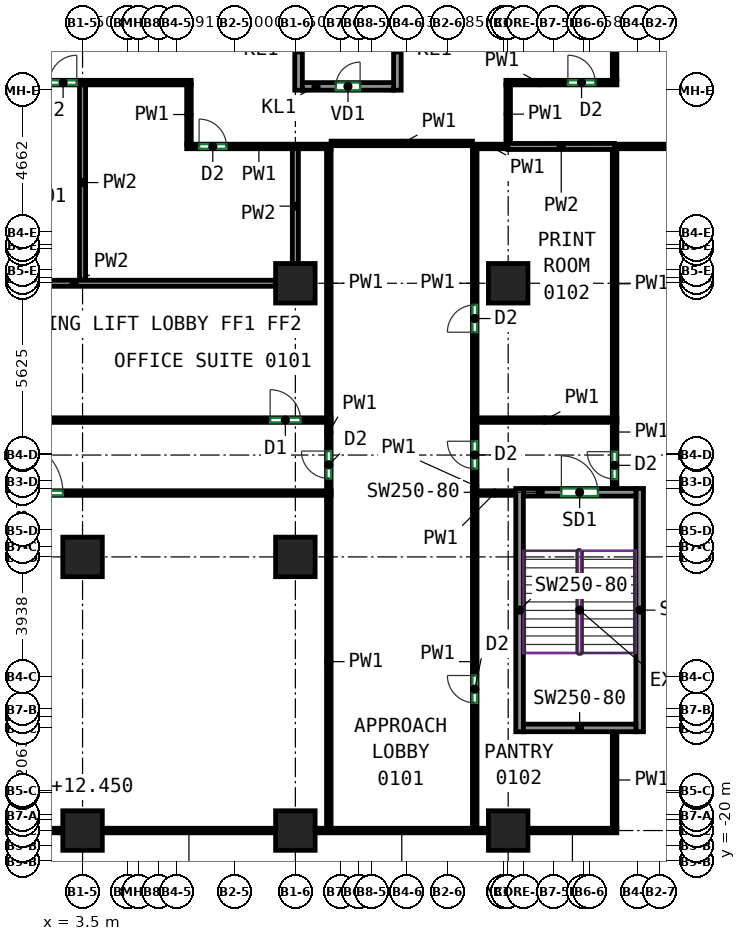
"""IFC4 building model, lengths in metres.
Left out: names, types, materials, properties, quantities, classifications, styles, units other than length and angle.
Written with IfcOpenShell. Run it as: python <this file> out.ifc"""

import sys

from ifc_helpers import new_model, si_unit, direction, frame, frame_2d, origin, origin_2d, place, context, subcontext, project, spatial, rectangle, extrude, source, transform, mapped, element, fill, save


model = new_model("IFC4")
c1 = context("Model", 3, precision=1e-05, world=origin(), true_north=direction((0.0, 1.0)))
c2 = subcontext(c1, "Body", "Model", "MODEL_VIEW")
j1 = project(units=[si_unit("LENGTHUNIT", "METRE"), si_unit("PLANEANGLEUNIT", "RADIAN")], contexts=[c1])
p1 = place(None, origin())
s1 = spatial("IfcSite", under=j1, at=p1, CompositionType="ELEMENT")
p2 = place(p1, origin())
s2 = spatial("IfcBuilding", under=s1, at=p2, CompositionType="ELEMENT")
p3 = place(p2, frame((0.0, 0.0, 9.0)))
s3 = spatial("IfcBuildingStorey", under=s2, at=p3, CompositionType="ELEMENT", Elevation=9.0)
m1 = source(origin(), c2, "Body", "SweptSolid", [
    extrude(rectangle(XDim=1.3, YDim=1.3, at=origin_2d()), origin(), (0.0, 0.0, 1.0), 4.1),
])
for number, where, z_axis, x_axis in (
    (1, (3.5, -19.0, 0.0), (0.0, 0.0, 1.0), (1.0, 0.0, 0.0)),
    (2, (3.5, -10.0, 0.0), (0.0, 0.0, 1.0), (1.0, 0.0, 0.0)),
    (3, (10.5, -19.0, 0.0), (0.0, 0.0, 1.0), (1.0, 0.0, 0.0)),
    (4, (10.5, -10.0, 0.0), (0.0, 0.0, 1.0), (1.0, 0.0, 0.0)),
    (5, (10.5, -1.0, 0.0), (0.0, 0.0, 1.0), (1.0, 0.0, 0.0)),
    (6, (17.5, -19.0, 0.0), (0.0, 0.0, 1.0), (1.0, 0.0, 0.0)),
    (7, (17.5, -1.0, 0.0), (0.0, 0.0, 1.0), (1.0, 0.0, 0.0)),
):
    element("IfcColumn", number, at=place(p3, frame(where, z_axis=z_axis, x_axis=x_axis)), inside=s3, PredefinedType="COLUMN", context=c2, shape_type="MappedRepresentation", body=[
        mapped(m1, transform((0.0, 0.0, 0.0))),
    ])
m2 = source(origin(), c2, "Body", "SweptSolid", [
    extrude(rectangle(XDim=8.0, YDim=0.25, at=frame_2d((4.0, 0.0))), origin(), (0.0, 0.0, 1.0), 4.1),
])
for number, where, z_axis, x_axis in (
    (8, (17.875, -15.75, 0.0), (0.0, 0.0, 1.0), (0.0, 1.0, 0.0)),
    (9, (21.825, -15.75, 0.0), (0.0, 0.0, 1.0), (0.0, 1.0, 0.0)),
):
    element("IfcWall", number, at=place(p3, frame(where, z_axis=z_axis, x_axis=x_axis)), inside=s3, PredefinedType="SHEAR", context=c2, shape_type="MappedRepresentation", body=[
        mapped(m2, transform((0.0, 0.0, 0.0))),
    ])
m3 = source(origin(), c2, "Body", "SweptSolid", [
    extrude(rectangle(XDim=3.7, YDim=0.25, at=frame_2d((1.85, 0.0))), origin(), (0.0, 0.0, 1.0), 4.1),
])
p4 = place(p3, frame((18.0, -15.625, 0.0), z_axis=(0.0, 0.0, 1.0), x_axis=(1.0, 0.0, 0.0)))
e10 = element("IfcWall", 10, at=p4, inside=s3, PredefinedType="SHEAR", context=c2, shape_type="MappedRepresentation", body=[
    mapped(m3, transform((0.0, 0.0, 0.0))),
])
p5 = place(p3, frame((18.0, -7.875, 0.0), z_axis=(0.0, 0.0, 1.0), x_axis=(1.0, 0.0, 0.0)))
e11 = element("IfcWall", 11, at=p5, inside=s3, PredefinedType="SHEAR", context=c2, shape_type="MappedRepresentation", body=[
    mapped(m3, transform((0.0, 0.0, 0.0))),
])
p6 = place(p5, frame((1.25, 0.0, 0.0)))
e12 = element("IfcOpeningElement", 12, at=p6, cuts=e11, PredefinedType="OPENING", context=c2, shape_type="SweptSolid", body=[
    extrude(rectangle(XDim=1.2, YDim=2.1, at=frame_2d((0.6, 1.05))), frame((0.0, 0.135, 0.0), z_axis=(0.0, -1.0, 0.0), x_axis=(1.0, 0.0, 0.0)), (0.0, 0.0, 1.0), 0.27),
])
m4 = source(origin(), c2, "Body", "SweptSolid", [
    extrude(rectangle(XDim=2.65, YDim=0.25, at=frame_2d((1.325, 0.0))), origin(), (0.0, 0.0, 1.0), 4.1),
])
for number, where, z_axis, x_axis in (
    (13, (10.605, 5.35, 0.0), (0.0, 0.0, 1.0), (0.0, 1.0, 0.0)),
    (14, (13.855, 5.35, 0.0), (0.0, 0.0, 1.0), (0.0, 1.0, 0.0)),
):
    element("IfcWall", number, at=place(p3, frame(where, z_axis=z_axis, x_axis=x_axis)), inside=s3, PredefinedType="PARTITIONING", context=c2, shape_type="MappedRepresentation", body=[
        mapped(m4, transform((0.0, 0.0, 0.0))),
    ])
m5 = source(origin(), c2, "Body", "SweptSolid", [
    extrude(rectangle(XDim=3.0, YDim=0.25, at=frame_2d((1.5, 0.0))), origin(), (0.0, 0.0, 1.0), 4.1),
])
p7 = place(p3, frame((10.73, 5.475, 0.0), z_axis=(0.0, 0.0, 1.0), x_axis=(1.0, 0.0, 0.0)))
e15 = element("IfcWall", 15, at=p7, inside=s3, PredefinedType="PARTITIONING", context=c2, shape_type="MappedRepresentation", body=[
    mapped(m5, transform((0.0, 0.0, 0.0))),
])
p8 = place(p7, frame((1.1, 0.0, 0.0)))
e16 = element("IfcOpeningElement", 16, at=p8, cuts=e15, PredefinedType="OPENING", context=c2, shape_type="SweptSolid", body=[
    extrude(rectangle(XDim=0.8, YDim=2.0, at=frame_2d((0.4, 1.0))), frame((0.0, 0.135, 0.0), z_axis=(0.0, -1.0, 0.0), x_axis=(1.0, 0.0, 0.0)), (0.0, 0.0, 1.0), 0.27),
])
p9 = place(p3, frame((21.0, -7.75, 0.0), z_axis=(0.0, 0.0, 1.0), x_axis=(0.0, 1.0, 0.0)))
e17 = element("IfcWall", 17, at=p9, inside=s3, PredefinedType="PARTITIONING", context=c2, shape_type="SweptSolid", body=[
    extrude(rectangle(XDim=2.185, YDim=0.15, at=frame_2d((1.093, 0.0))), origin(), (0.0, 0.0, 1.0), 4.1),
])
p10 = place(p9, frame((0.311, 0.0, 0.0)))
e18 = element("IfcOpeningElement", 18, at=p10, cuts=e17, PredefinedType="OPENING", context=c2, shape_type="SweptSolid", body=[
    extrude(rectangle(XDim=0.9, YDim=2.1, at=frame_2d((0.45, 1.05))), frame((0.0, 0.085, 0.0), z_axis=(0.0, -1.0, 0.0), x_axis=(1.0, 0.0, 0.0)), (0.0, 0.0, 1.0), 0.17),
])
for number, where, z_axis, x_axis in (
    (19, (-2.85, -19.0, 0.0), (0.0, 0.0, 1.0), (1.0, 0.0, 0.0)),
    (20, (4.15, -19.0, 0.0), (0.0, 0.0, 1.0), (1.0, 0.0, 0.0)),
    (21, (11.15, -19.0, 0.0), (0.0, 0.0, 1.0), (1.0, 0.0, 0.0)),
):
    element("IfcWall", number, at=place(p3, frame(where, z_axis=z_axis, x_axis=x_axis)), inside=s3, PredefinedType="PARTITIONING", context=c2, shape_type="SweptSolid", body=[
        extrude(rectangle(XDim=5.7, YDim=0.15, at=frame_2d((2.85, 0.0))), origin(), (0.0, 0.0, 1.0), 3.45),
    ])
p11 = place(p3, frame((21.0, -5.434, 0.0), z_axis=(0.0, 0.0, 1.0), x_axis=(0.0, 1.0, 0.0)))
e22 = element("IfcWall", 22, at=p11, inside=s3, PredefinedType="PARTITIONING", context=c2, shape_type="SweptSolid", body=[
    extrude(rectangle(XDim=8.834, YDim=0.15, at=frame_2d((4.417, 0.0))), origin(), (0.0, 0.0, 1.0), 4.1),
])
p12 = place(p3, frame((20.999, 3.5, 0.0), z_axis=(0.0, 0.0, 1.0), x_axis=(1.0, 0.0, 0.0)))
e23 = element("IfcWall", 23, at=p12, inside=s3, PredefinedType="PARTITIONING", context=c2, shape_type="SweptSolid", body=[
    extrude(rectangle(XDim=6.751, YDim=0.15, at=frame_2d((3.375, 0.0))), origin(), (0.0, 0.0, 1.0), 4.1),
])
p13 = place(p3, frame((18.15, -19.0, 0.0), z_axis=(0.0, 0.0, 1.0), x_axis=(1.0, 0.0, 0.0)))
e24 = element("IfcWall", 24, at=p13, inside=s3, PredefinedType="PARTITIONING", context=c2, shape_type="SweptSolid", body=[
    extrude(rectangle(XDim=2.925, YDim=0.15, at=frame_2d((1.462, 0.0))), origin(), (0.0, 0.0, 1.0), 3.45),
])
p14 = place(p3, frame((21.0, -18.925, 0.0), z_axis=(0.0, 0.0, 1.0), x_axis=(0.0, 1.0, 0.0)))
e25 = element("IfcWall", 25, at=p14, inside=s3, PredefinedType="PARTITIONING", context=c2, shape_type="SweptSolid", body=[
    extrude(rectangle(XDim=3.175, YDim=0.15, at=frame_2d((1.587, 0.0))), origin(), (0.0, 0.0, 1.0), 4.1),
])
p15 = place(p3, frame((11.6, -7.835, 0.0), z_axis=(0.0, 0.0, 1.0), x_axis=(0.0, 1.0, 0.0)))
e26 = element("IfcWall", 26, at=p15, inside=s3, PredefinedType="PARTITIONING", context=c2, shape_type="SweptSolid", body=[
    extrude(rectangle(XDim=2.27, YDim=0.15, at=frame_2d((1.135, 0.0))), origin(), (0.0, 0.0, 1.0), 4.1),
])
p16 = place(p15, frame((0.416, 0.0, 0.0)))
e27 = element("IfcOpeningElement", 27, at=p16, cuts=e26, PredefinedType="OPENING", context=c2, shape_type="SweptSolid", body=[
    extrude(rectangle(XDim=0.9, YDim=2.1, at=frame_2d((0.45, 1.05))), frame((0.0, 0.085, 0.0), z_axis=(0.0, -1.0, 0.0), x_axis=(1.0, 0.0, 0.0)), (0.0, 0.0, 1.0), 0.17),
])
p17 = place(p3, frame((16.4, -7.835, 0.0), z_axis=(0.0, 0.0, 1.0), x_axis=(0.0, 1.0, 0.0)))
e28 = element("IfcWall", 28, at=p17, inside=s3, PredefinedType="PARTITIONING", context=c2, shape_type="SweptSolid", body=[
    extrude(rectangle(XDim=2.27, YDim=0.15, at=frame_2d((1.135, 0.0))), origin(), (0.0, 0.0, 1.0), 4.1),
])
p18 = place(p17, frame((0.739, 0.0, 0.0)))
e29 = element("IfcOpeningElement", 29, at=p18, cuts=e28, PredefinedType="OPENING", context=c2, shape_type="SweptSolid", body=[
    extrude(rectangle(XDim=0.9, YDim=2.1, at=frame_2d((0.45, 1.05))), frame((0.0, 0.085, 0.0), z_axis=(0.0, -1.0, 0.0), x_axis=(1.0, 0.0, 0.0)), (0.0, 0.0, 1.0), 0.17),
])
p19 = place(p3, frame((16.325, 3.6, 0.0), z_axis=(0.0, 0.0, 1.0), x_axis=(-1.0, 0.0, 0.0)))
e30 = element("IfcWall", 30, at=p19, inside=s3, PredefinedType="PARTITIONING", context=c2, shape_type="SweptSolid", body=[
    extrude(rectangle(XDim=4.65, YDim=0.15, at=frame_2d((2.325, 0.0))), origin(), (0.0, 0.0, 1.0), 4.1),
])
p20 = place(p3, frame((11.6, -18.925, 0.0), z_axis=(0.0, 0.0, 1.0), x_axis=(0.0, 1.0, 0.0)))
e31 = element("IfcWall", 31, at=p20, inside=s3, PredefinedType="PARTITIONING", context=c2, shape_type="SweptSolid", body=[
    extrude(rectangle(XDim=10.959, YDim=0.15, at=frame_2d((5.479, 0.0))), origin(), (0.0, 0.0, 1.0), 4.1),
])
p21 = place(p3, frame((11.6, -5.434, 0.0), z_axis=(0.0, 0.0, 1.0), x_axis=(0.0, 1.0, 0.0)))
e32 = element("IfcWall", 32, at=p21, inside=s3, PredefinedType="PARTITIONING", context=c2, shape_type="SweptSolid", body=[
    extrude(rectangle(XDim=8.868, YDim=0.15, at=frame_2d((4.434, 0.0))), origin(), (0.0, 0.0, 1.0), 4.1),
])
p22 = place(p3, frame((16.4, -5.434, 0.0), z_axis=(0.0, 0.0, 1.0), x_axis=(0.0, 1.0, 0.0)))
e33 = element("IfcWall", 33, at=p22, inside=s3, PredefinedType="PARTITIONING", context=c2, shape_type="SweptSolid", body=[
    extrude(rectangle(XDim=8.868, YDim=0.15, at=frame_2d((4.434, 0.0))), origin(), (0.0, 0.0, 1.0), 4.1),
])
p23 = place(p22, frame((2.824, 0.0, 0.0)))
e34 = element("IfcOpeningElement", 34, at=p23, cuts=e33, PredefinedType="OPENING", context=c2, shape_type="SweptSolid", body=[
    extrude(rectangle(XDim=0.9, YDim=2.1, at=frame_2d((0.45, 1.05))), frame((0.0, 0.085, 0.0), z_axis=(0.0, -1.0, 0.0), x_axis=(1.0, 0.0, 0.0)), (0.0, 0.0, 1.0), 0.17),
])
p24 = place(p3, frame((16.4, -18.925, 0.0), z_axis=(0.0, 0.0, 1.0), x_axis=(0.0, 1.0, 0.0)))
e35 = element("IfcWall", 35, at=p24, inside=s3, PredefinedType="PARTITIONING", context=c2, shape_type="SweptSolid", body=[
    extrude(rectangle(XDim=10.959, YDim=0.15, at=frame_2d((5.479, 0.0))), origin(), (0.0, 0.0, 1.0), 4.1),
])
p25 = place(p24, frame((4.124, 0.0, 0.0)))
e36 = element("IfcOpeningElement", 36, at=p25, cuts=e35, PredefinedType="OPENING", context=c2, shape_type="SweptSolid", body=[
    extrude(rectangle(XDim=0.9, YDim=2.1, at=frame_2d((0.45, 1.05))), frame((0.0, 0.085, 0.0), z_axis=(0.0, -1.0, 0.0), x_axis=(1.0, 0.0, 0.0)), (0.0, 0.0, 1.0), 0.17),
])
p26 = place(p3, frame((-11.775, -7.9, 0.0), z_axis=(0.0, 0.0, 1.0), x_axis=(1.0, 0.0, 0.0)))
e37 = element("IfcWall", 37, at=p26, inside=s3, PredefinedType="PARTITIONING", context=c2, shape_type="SweptSolid", body=[
    extrude(rectangle(XDim=23.45, YDim=0.15, at=frame_2d((11.725, 0.0))), origin(), (0.0, 0.0, 1.0), 4.1),
])
p27 = place(p26, frame((12.83, 0.0, 0.0)))
e38 = element("IfcOpeningElement", 38, at=p27, cuts=e37, PredefinedType="OPENING", context=c2, shape_type="SweptSolid", body=[
    extrude(rectangle(XDim=1.8, YDim=2.1, at=frame_2d((0.9, 1.05))), frame((0.0, 0.085, 0.0), z_axis=(0.0, -1.0, 0.0), x_axis=(1.0, 0.0, 0.0)), (0.0, 0.0, 1.0), 0.17),
])
p28 = place(p3, frame((-17.075, -5.5, 0.0), z_axis=(0.0, 0.0, 1.0), x_axis=(1.0, 0.0, 0.0)))
e39 = element("IfcWall", 39, at=p28, inside=s3, PredefinedType="PARTITIONING", context=c2, shape_type="SweptSolid", body=[
    extrude(rectangle(XDim=28.75, YDim=0.15, at=frame_2d((14.375, 0.0))), origin(), (0.0, 0.0, 1.0), 4.1),
])
p29 = place(p28, frame((1.912, 0.0, 0.0)))
e40 = element("IfcOpeningElement", 40, at=p29, cuts=e39, PredefinedType="OPENING", context=c2, shape_type="SweptSolid", body=[
    extrude(rectangle(XDim=0.9, YDim=2.1, at=frame_2d((0.45, 1.05))), frame((0.0, 0.085, 0.0), z_axis=(0.0, -1.0, 0.0), x_axis=(1.0, 0.0, 0.0)), (0.0, 0.0, 1.0), 0.17),
])
p30 = place(p28, frame((26.745, 0.0, 0.0)))
e41 = element("IfcOpeningElement", 41, at=p30, cuts=e39, PredefinedType="OPENING", context=c2, shape_type="SweptSolid", body=[
    extrude(rectangle(XDim=1.0, YDim=2.1, at=frame_2d((0.5, 1.05))), frame((0.0, 0.085, 0.0), z_axis=(0.0, -1.0, 0.0), x_axis=(1.0, 0.0, 0.0)), (0.0, 0.0, 1.0), 0.17),
])
p31 = place(p3, frame((16.325, -5.5, 0.0), z_axis=(0.0, 0.0, 1.0), x_axis=(1.0, 0.0, 0.0)))
e42 = element("IfcWall", 42, at=p31, inside=s3, PredefinedType="PARTITIONING", context=c2, shape_type="SweptSolid", body=[
    extrude(rectangle(XDim=4.75, YDim=0.15, at=frame_2d((2.375, 0.0))), origin(), (0.0, 0.0, 1.0), 4.1),
])
p32 = place(p3, frame((16.325, -7.9, 0.0), z_axis=(0.0, 0.0, 1.0), x_axis=(1.0, 0.0, 0.0)))
e43 = element("IfcWall", 43, at=p32, inside=s3, PredefinedType="PARTITIONING", context=c2, shape_type="SweptSolid", body=[
    extrude(rectangle(XDim=1.475, YDim=0.15, at=frame_2d((0.738, 0.0))), origin(), (0.0, 0.0, 1.0), 4.1),
])
p33 = place(p3, frame((-3.575, 5.6, 0.0), z_axis=(0.0, 0.0, 1.0), x_axis=(1.0, 0.0, 0.0)))
e44 = element("IfcWall", 44, at=p33, inside=s3, PredefinedType="PARTITIONING", context=c2, shape_type="SweptSolid", body=[
    extrude(rectangle(XDim=10.65, YDim=0.15, at=frame_2d((5.325, 0.0))), origin(), (0.0, 0.0, 1.0), 4.1),
])
p34 = place(p33, frame((5.985, 0.0, 0.0)))
e45 = element("IfcOpeningElement", 45, at=p34, cuts=e44, PredefinedType="OPENING", context=c2, shape_type="SweptSolid", body=[
    extrude(rectangle(XDim=0.9, YDim=2.1, at=frame_2d((0.45, 1.05))), frame((0.0, 0.085, 0.0), z_axis=(0.0, -1.0, 0.0), x_axis=(1.0, 0.0, 0.0)), (0.0, 0.0, 1.0), 0.17),
])
p35 = place(p3, frame((6.925, 3.5, 0.0), z_axis=(0.0, 0.0, 1.0), x_axis=(1.0, 0.0, 0.0)))
e46 = element("IfcWall", 46, at=p35, inside=s3, PredefinedType="PARTITIONING", context=c2, shape_type="SweptSolid", body=[
    extrude(rectangle(XDim=4.75, YDim=0.15, at=frame_2d((2.375, 0.0))), origin(), (0.0, 0.0, 1.0), 4.1),
])
p36 = place(p35, frame((0.408, 0.0, 0.0)))
e47 = element("IfcOpeningElement", 47, at=p36, cuts=e46, PredefinedType="OPENING", context=c2, shape_type="SweptSolid", body=[
    extrude(rectangle(XDim=0.9, YDim=2.1, at=frame_2d((0.45, 1.05))), frame((0.0, 0.085, 0.0), z_axis=(0.0, -1.0, 0.0), x_axis=(1.0, 0.0, 0.0)), (0.0, 0.0, 1.0), 0.17),
])
p37 = place(p3, frame((7.0, 5.525, 0.0), z_axis=(0.0, 0.0, 1.0), x_axis=(0.0, -1.0, 0.0)))
e48 = element("IfcWall", 48, at=p37, inside=s3, PredefinedType="PARTITIONING", context=c2, shape_type="SweptSolid", body=[
    extrude(rectangle(XDim=1.95, YDim=0.15, at=frame_2d((0.975, 0.0))), origin(), (0.0, 0.0, 1.0), 4.1),
])
p38 = place(p3, frame((16.325, 3.5, 0.0), z_axis=(0.0, 0.0, 1.0), x_axis=(1.0, 0.0, 0.0)))
e49 = element("IfcWall", 49, at=p38, inside=s3, PredefinedType="PARTITIONING", context=c2, shape_type="SweptSolid", body=[
    extrude(rectangle(XDim=1.166, YDim=0.15, at=frame_2d((0.583, 0.0))), origin(), (0.0, 0.0, 1.0), 4.1),
])
p39 = place(p3, frame((21.0, 5.675, 0.0), z_axis=(0.0, 0.0, 1.0), x_axis=(0.0, 1.0, 0.0)))
e50 = element("IfcWall", 50, at=p39, inside=s3, PredefinedType="PARTITIONING", context=c2, shape_type="SweptSolid", body=[
    extrude(rectangle(XDim=2.235, YDim=0.15, at=frame_2d((1.117, 0.0))), origin(), (0.0, 0.0, 1.0), 4.1),
])
p40 = place(p3, frame((17.425, 5.6, 0.0), z_axis=(0.0, 0.0, 1.0), x_axis=(1.0, 0.0, 0.0)))
e51 = element("IfcWall", 51, at=p40, inside=s3, PredefinedType="PARTITIONING", context=c2, shape_type="SweptSolid", body=[
    extrude(rectangle(XDim=3.65, YDim=0.15, at=frame_2d((1.825, 0.0))), origin(), (0.0, 0.0, 1.0), 4.1),
])
p41 = place(p40, frame((2.039, 0.0, 0.0)))
e52 = element("IfcOpeningElement", 52, at=p41, cuts=e51, PredefinedType="OPENING", context=c2, shape_type="SweptSolid", body=[
    extrude(rectangle(XDim=0.9, YDim=2.1, at=frame_2d((0.45, 1.05))), frame((0.0, 0.085, 0.0), z_axis=(0.0, -1.0, 0.0), x_axis=(1.0, 0.0, 0.0)), (0.0, 0.0, 1.0), 0.17),
])
p42 = place(p3, frame((17.5, 3.599, 0.0), z_axis=(0.0, 0.0, 1.0), x_axis=(0.0, 1.0, 0.0)))
e53 = element("IfcWall", 53, at=p42, inside=s3, PredefinedType="PARTITIONING", context=c2, shape_type="SweptSolid", body=[
    extrude(rectangle(XDim=1.926, YDim=0.15, at=frame_2d((0.963, 0.0))), origin(), (0.0, 0.0, 1.0), 4.1),
])
p43 = place(p3, frame((3.5, -0.9, 0.0), z_axis=(0.0, 0.0, 1.0), x_axis=(0.0, 1.0, 0.0)))
e54 = element("IfcWall", 54, at=p43, inside=s3, PredefinedType="PARTITIONING", context=c2, shape_type="SweptSolid", body=[
    extrude(rectangle(XDim=6.424, YDim=0.2, at=frame_2d((3.212, 0.0))), origin(), (0.0, 0.0, 1.0), 4.1),
])
p44 = place(p3, frame((-3.4, -1.0, 0.0), z_axis=(0.0, 0.0, 1.0), x_axis=(1.0, 0.0, 0.0)))
e55 = element("IfcWall", 55, at=p44, inside=s3, PredefinedType="PARTITIONING", context=c2, shape_type="SweptSolid", body=[
    extrude(rectangle(XDim=13.25, YDim=0.2, at=frame_2d((6.625, 0.0))), origin(), (0.0, 0.0, 1.0), 4.1),
])
p45 = place(p3, frame((10.5, -0.35, 0.0), z_axis=(0.0, 0.0, 1.0), x_axis=(0.0, 1.0, 0.0)))
e56 = element("IfcWall", 56, at=p45, inside=s3, PredefinedType="PARTITIONING", context=c2, shape_type="SweptSolid", body=[
    extrude(rectangle(XDim=3.774, YDim=0.2, at=frame_2d((1.887, 0.0))), origin(), (0.0, 0.0, 1.0), 4.1),
])
p46 = place(p3, frame((20.999, 3.5, 0.0), z_axis=(0.0, 0.0, 1.0), x_axis=(-0.999999961253, -0.000278377051, 0.0)))
e57 = element("IfcWall", 57, at=p46, inside=s3, PredefinedType="PARTITIONING", context=c2, shape_type="SweptSolid", body=[
    extrude(rectangle(XDim=3.508, YDim=0.2, at=frame_2d((1.754, 0.0))), origin(), (0.0, 0.0, 1.0), 4.1),
])
p47 = place(p8, origin())
e58 = element("IfcDoor", 58, at=p47, inside=s3, OperationType="SINGLE_SWING_RIGHT", PredefinedType="DOOR", context=c2, shape_type="SweptSolid", body=[
    extrude(rectangle(XDim=0.8, YDim=2.0, at=frame_2d((0.4, 1.0))), frame((0.0, 0.025, 0.0), z_axis=(0.0, -1.0, 0.0), x_axis=(1.0, 0.0, 0.0)), (0.0, 0.0, 1.0), 0.05),
])
fill(e16, e58)
p48 = place(p6, origin())
e59 = element("IfcDoor", 59, at=p48, inside=s3, OperationType="DOUBLE_DOOR_SINGLE_SWING", PredefinedType="DOOR", context=c2, shape_type="SweptSolid", body=[
    extrude(rectangle(XDim=1.2, YDim=2.1, at=frame_2d((0.6, 1.05))), frame((0.0, 0.025, 0.0), z_axis=(0.0, -1.0, 0.0), x_axis=(1.0, 0.0, 0.0)), (0.0, 0.0, 1.0), 0.05),
])
fill(e12, e59)
p49 = place(p25, origin())
e60 = element("IfcDoor", 60, at=p49, inside=s3, OperationType="SINGLE_SWING_RIGHT", PredefinedType="DOOR", context=c2, shape_type="SweptSolid", body=[
    extrude(rectangle(XDim=0.9, YDim=2.1, at=frame_2d((0.45, 1.05))), frame((0.0, 0.025, 0.0), z_axis=(0.0, -1.0, 0.0), x_axis=(1.0, 0.0, 0.0)), (0.0, 0.0, 1.0), 0.05),
])
fill(e36, e60)
p50 = place(p27, origin())
e61 = element("IfcDoor", 61, at=p50, inside=s3, OperationType="DOUBLE_DOOR_SINGLE_SWING", PredefinedType="DOOR", context=c2, shape_type="SweptSolid", body=[
    extrude(rectangle(XDim=1.8, YDim=2.1, at=frame_2d((0.9, 1.05))), frame((0.0, 0.025, 0.0), z_axis=(0.0, -1.0, 0.0), x_axis=(1.0, 0.0, 0.0)), (0.0, 0.0, 1.0), 0.05),
])
fill(e38, e61)
p51 = place(p10, origin())
e62 = element("IfcDoor", 62, at=p51, inside=s3, OperationType="SINGLE_SWING_RIGHT", PredefinedType="DOOR", context=c2, shape_type="SweptSolid", body=[
    extrude(rectangle(XDim=0.9, YDim=2.1, at=frame_2d((0.45, 1.05))), frame((0.0, 0.025, 0.0), z_axis=(0.0, -1.0, 0.0), x_axis=(1.0, 0.0, 0.0)), (0.0, 0.0, 1.0), 0.05),
])
fill(e18, e62)
p52 = place(p16, origin())
e63 = element("IfcDoor", 63, at=p52, inside=s3, OperationType="SINGLE_SWING_RIGHT", PredefinedType="DOOR", context=c2, shape_type="SweptSolid", body=[
    extrude(rectangle(XDim=0.9, YDim=2.1, at=frame_2d((0.45, 1.05))), frame((0.0, 0.025, 0.0), z_axis=(0.0, -1.0, 0.0), x_axis=(1.0, 0.0, 0.0)), (0.0, 0.0, 1.0), 0.05),
])
fill(e27, e63)
p53 = place(p18, origin())
e64 = element("IfcDoor", 64, at=p53, inside=s3, OperationType="SINGLE_SWING_RIGHT", PredefinedType="DOOR", context=c2, shape_type="SweptSolid", body=[
    extrude(rectangle(XDim=0.9, YDim=2.1, at=frame_2d((0.45, 1.05))), frame((0.0, 0.025, 0.0), z_axis=(0.0, -1.0, 0.0), x_axis=(1.0, 0.0, 0.0)), (0.0, 0.0, 1.0), 0.05),
])
fill(e29, e64)
p54 = place(p30, origin())
e65 = element("IfcDoor", 65, at=p54, inside=s3, OperationType="SINGLE_SWING_LEFT", PredefinedType="DOOR", context=c2, shape_type="SweptSolid", body=[
    extrude(rectangle(XDim=1.0, YDim=2.1, at=frame_2d((0.5, 1.05))), frame((0.0, 0.025, 0.0), z_axis=(0.0, -1.0, 0.0), x_axis=(1.0, 0.0, 0.0)), (0.0, 0.0, 1.0), 0.05),
])
fill(e41, e65)
p55 = place(p23, origin())
e66 = element("IfcDoor", 66, at=p55, inside=s3, OperationType="SINGLE_SWING_LEFT", PredefinedType="DOOR", context=c2, shape_type="SweptSolid", body=[
    extrude(rectangle(XDim=0.9, YDim=2.1, at=frame_2d((0.45, 1.05))), frame((0.0, 0.025, 0.0), z_axis=(0.0, -1.0, 0.0), x_axis=(1.0, 0.0, 0.0)), (0.0, 0.0, 1.0), 0.05),
])
fill(e34, e66)
p56 = place(p36, origin())
e67 = element("IfcDoor", 67, at=p56, inside=s3, OperationType="SINGLE_SWING_LEFT", PredefinedType="DOOR", context=c2, shape_type="SweptSolid", body=[
    extrude(rectangle(XDim=0.9, YDim=2.1, at=frame_2d((0.45, 1.05))), frame((0.0, 0.025, 0.0), z_axis=(0.0, -1.0, 0.0), x_axis=(1.0, 0.0, 0.0)), (0.0, 0.0, 1.0), 0.05),
])
fill(e47, e67)
p57 = place(p34, origin())
e68 = element("IfcDoor", 68, at=p57, inside=s3, OperationType="SINGLE_SWING_RIGHT", PredefinedType="DOOR", context=c2, shape_type="SweptSolid", body=[
    extrude(rectangle(XDim=0.9, YDim=2.1, at=frame_2d((0.45, 1.05))), frame((0.0, 0.025, 0.0), z_axis=(0.0, -1.0, 0.0), x_axis=(1.0, 0.0, 0.0)), (0.0, 0.0, 1.0), 0.05),
])
fill(e45, e68)
p58 = place(p41, origin())
e69 = element("IfcDoor", 69, at=p58, inside=s3, OperationType="SINGLE_SWING_LEFT", PredefinedType="DOOR", context=c2, shape_type="SweptSolid", body=[
    extrude(rectangle(XDim=0.9, YDim=2.1, at=frame_2d((0.45, 1.05))), frame((0.0, 0.025, 0.0), z_axis=(0.0, -1.0, 0.0), x_axis=(1.0, 0.0, 0.0)), (0.0, 0.0, 1.0), 0.05),
])
fill(e52, e69)
save(model, sys.argv[1])
